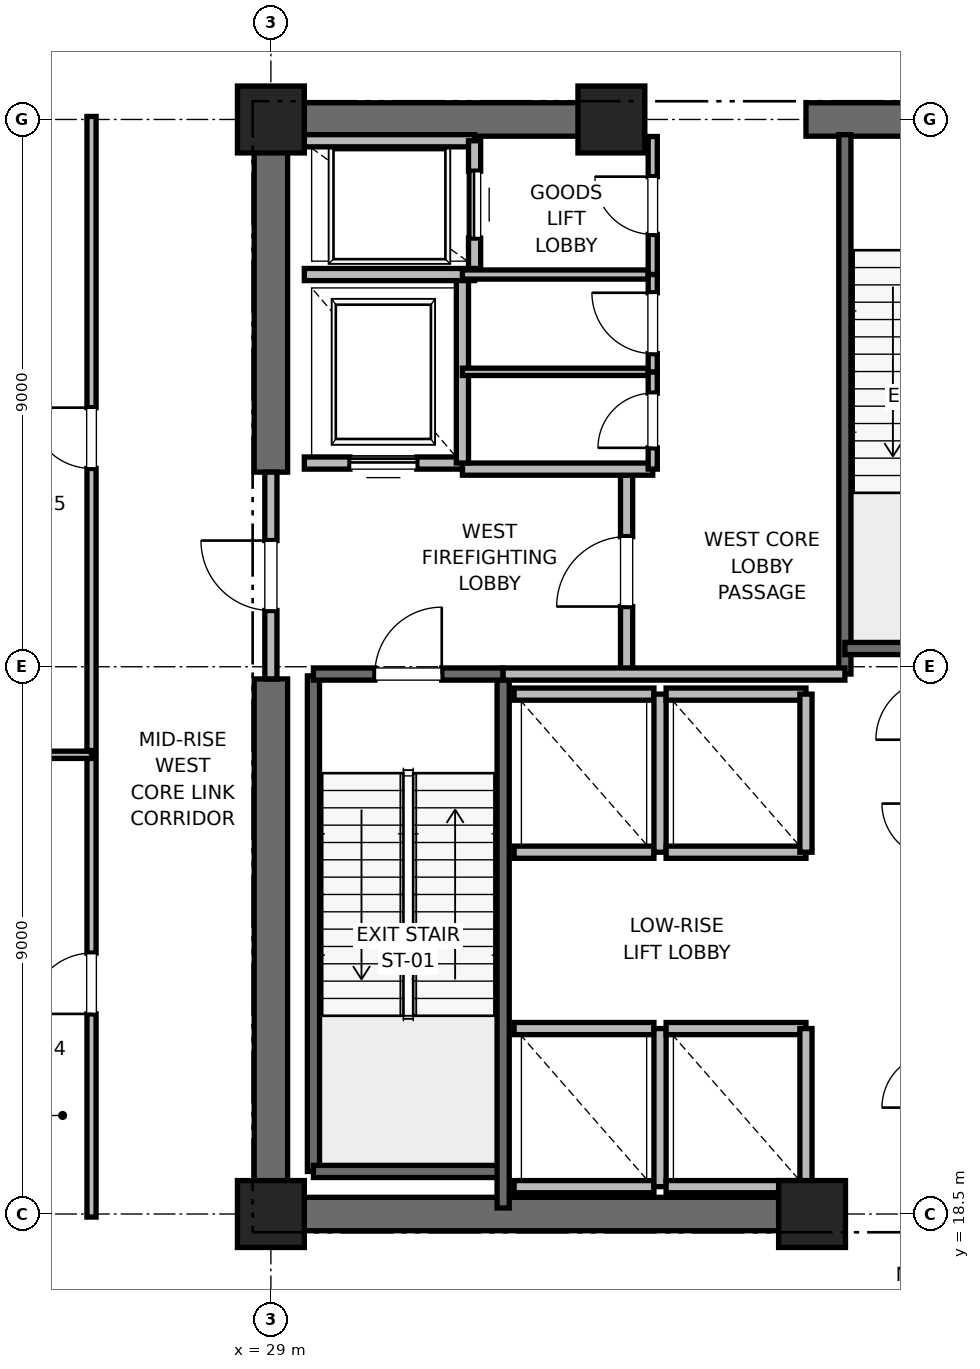
"""IFC4 building model, lengths in metres.
Left out: names, types, materials, properties, quantities, classifications, styles, units other than length and angle.
Written with IfcOpenShell. Run it as: python <this file> out.ifc"""

import sys

from ifc_helpers import new_model, si_unit, direction, frame, frame_2d, origin, origin_2d, place, context, subcontext, project, spatial, rectangle, extrude, element, fill, save


model = new_model("IFC4")
c1 = context("Model", 3, precision=1e-05, world=origin(), true_north=direction((0.0, 1.0)))
c2 = subcontext(c1, "Body", "Model", "MODEL_VIEW")
j1 = project(units=[si_unit("LENGTHUNIT", "METRE"), si_unit("PLANEANGLEUNIT", "RADIAN")], contexts=[c1])
p1 = place(None, origin())
s1 = spatial("IfcSite", under=j1, at=p1, CompositionType="ELEMENT")
p2 = place(p1, origin())
s2 = spatial("IfcBuilding", under=s1, at=p2, CompositionType="ELEMENT")
p3 = place(p2, frame((0.0, 0.0, 123.4)))
s3 = spatial("IfcBuildingStorey", under=s2, at=p3, CompositionType="ELEMENT", Elevation=123.4)
for number, where, z_axis, x_axis in (
    (1, (29.0, 18.5, 0.0), (0.0, 0.0, 1.0), (1.0, 0.0, 0.0)),
    (2, (29.0, 36.5, 0.0), (0.0, 0.0, 1.0), (1.0, 0.0, 0.0)),
    (3, (37.9, 18.5, 0.0), (0.0, 0.0, 1.0), (1.0, 0.0, 0.0)),
    (4, (34.6, 36.5, 0.0), (0.0, 0.0, 1.0), (1.0, 0.0, 0.0)),
):
    element("IfcColumn", number, at=place(p3, frame(where, z_axis=z_axis, x_axis=x_axis)), inside=s3, PredefinedType="PILASTER", context=c2, shape_type="SweptSolid", body=[
        extrude(rectangle(XDim=1.1, YDim=1.1, at=origin_2d()), origin(), (0.0, 0.0, 1.0), 5.0),
    ])
p4 = place(p3, frame((29.0, 18.5, 0.0), z_axis=(0.0, 0.0, 1.0), x_axis=(1.0, 0.0, 0.0)))
e5 = element("IfcWall", 5, at=p4, inside=s3, PredefinedType="SHEAR", context=c2, shape_type="SweptSolid", body=[
    extrude(rectangle(XDim=9.2, YDim=0.55, at=frame_2d((4.6, 0.0))), origin(), (0.0, 0.0, 1.0), 4.775),
])
p5 = place(p3, frame((29.0, 36.5, 0.0), z_axis=(0.0, 0.0, 1.0), x_axis=(1.0, 0.0, 0.0)))
e6 = element("IfcWall", 6, at=p5, inside=s3, PredefinedType="SHEAR", context=c2, shape_type="SweptSolid", body=[
    extrude(rectangle(XDim=5.8, YDim=0.55, at=frame_2d((2.9, 0.0))), origin(), (0.0, 0.0, 1.0), 4.775),
])
p6 = place(p3, frame((37.8, 36.5, 0.0), z_axis=(0.0, 0.0, 1.0), x_axis=(1.0, 0.0, 0.0)))
e7 = element("IfcWall", 7, at=p6, inside=s3, PredefinedType="SHEAR", context=c2, shape_type="SweptSolid", body=[
    extrude(rectangle(XDim=4.4, YDim=0.55, at=frame_2d((2.2, 0.0))), origin(), (0.0, 0.0, 1.0), 4.775),
])
p7 = place(p6, frame((1.65, 0.0, 0.0)))
e8 = element("IfcOpeningElement", 8, at=p7, cuts=e7, PredefinedType="OPENING", context=c2, shape_type="SweptSolid", body=[
    extrude(rectangle(XDim=1.1, YDim=2.15, at=frame_2d((0.55, 1.075))), frame((0.0, 0.275, 0.0), z_axis=(0.0, -1.0, 0.0), x_axis=(1.0, 0.0, 0.0)), (0.0, 0.0, 1.0), 0.55),
])
p8 = place(p3, frame((29.0, 18.5, 0.0), z_axis=(0.0, 0.0, 1.0), x_axis=(0.0, 1.0, 0.0)))
e9 = element("IfcWall", 9, at=p8, inside=s3, PredefinedType="SHEAR", context=c2, shape_type="SweptSolid", body=[
    extrude(rectangle(XDim=8.8, YDim=0.55, at=frame_2d((4.4, 0.0))), origin(), (0.0, 0.0, 1.0), 4.775),
])
p9 = place(p3, frame((29.0, 30.7, 0.0), z_axis=(0.0, 0.0, 1.0), x_axis=(0.0, 1.0, 0.0)))
e10 = element("IfcWall", 10, at=p9, inside=s3, PredefinedType="SHEAR", context=c2, shape_type="SweptSolid", body=[
    extrude(rectangle(XDim=5.8, YDim=0.55, at=frame_2d((2.9, 0.0))), origin(), (0.0, 0.0, 1.0), 4.775),
])
p10 = place(p3, frame((29.7, 19.2, 0.0), z_axis=(0.0, 0.0, 1.0), x_axis=(0.0, 1.0, 0.0)))
e11 = element("IfcWall", 11, at=p10, inside=s3, PredefinedType="SOLIDWALL", context=c2, shape_type="SweptSolid", body=[
    extrude(rectangle(XDim=8.15, YDim=0.2, at=frame_2d((4.075, 0.0))), origin(), (0.0, 0.0, 1.0), 4.775),
])
p11 = place(p3, frame((29.7, 19.2, 0.0), z_axis=(0.0, 0.0, 1.0), x_axis=(1.0, 0.0, 0.0)))
e12 = element("IfcWall", 12, at=p11, inside=s3, PredefinedType="SOLIDWALL", context=c2, shape_type="SweptSolid", body=[
    extrude(rectangle(XDim=3.12, YDim=0.2, at=frame_2d((1.56, 0.0))), origin(), (0.0, 0.0, 1.0), 4.775),
])
p12 = place(p3, frame((32.82, 18.6, 0.0), z_axis=(0.0, 0.0, 1.0), x_axis=(0.0, 1.0, 0.0)))
e13 = element("IfcWall", 13, at=p12, inside=s3, PredefinedType="SOLIDWALL", context=c2, shape_type="SweptSolid", body=[
    extrude(rectangle(XDim=8.78, YDim=0.2, at=frame_2d((4.39, 0.0))), origin(), (0.0, 0.0, 1.0), 4.775),
])
p13 = place(p3, frame((29.7, 27.38, 0.0), z_axis=(0.0, 0.0, 1.0), x_axis=(1.0, 0.0, 0.0)))
e14 = element("IfcWall", 14, at=p13, inside=s3, PredefinedType="SOLIDWALL", context=c2, shape_type="SweptSolid", body=[
    extrude(rectangle(XDim=3.12, YDim=0.2, at=frame_2d((1.56, 0.0))), origin(), (0.0, 0.0, 1.0), 4.775),
])
p14 = place(p13, frame((1.01, 0.0, 0.0)))
e15 = element("IfcOpeningElement", 15, at=p14, cuts=e14, PredefinedType="OPENING", context=c2, shape_type="SweptSolid", body=[
    extrude(rectangle(XDim=1.1, YDim=2.15, at=frame_2d((0.55, 1.075))), frame((0.0, 0.1, 0.0), z_axis=(0.0, -1.0, 0.0), x_axis=(1.0, 0.0, 0.0)), (0.0, 0.0, 1.0), 0.2),
])
p15 = place(p3, frame((38.44, 27.38, 0.0), z_axis=(0.0, 0.0, 1.0), x_axis=(0.0, 1.0, 0.0)))
e16 = element("IfcWall", 16, at=p15, inside=s3, PredefinedType="SOLIDWALL", context=c2, shape_type="SweptSolid", body=[
    extrude(rectangle(XDim=8.87, YDim=0.2, at=frame_2d((4.435, 0.0))), origin(), (0.0, 0.0, 1.0), 4.775),
])
p16 = place(p3, frame((38.44, 27.8, 0.0), z_axis=(0.0, 0.0, 1.0), x_axis=(1.0, 0.0, 0.0)))
e17 = element("IfcWall", 17, at=p16, inside=s3, PredefinedType="SOLIDWALL", context=c2, shape_type="SweptSolid", body=[
    extrude(rectangle(XDim=3.32, YDim=0.2, at=frame_2d((1.66, 0.0))), origin(), (0.0, 0.0, 1.0), 4.775),
])
p17 = place(p3, frame((34.85, 27.38, 0.0), z_axis=(0.0, 0.0, 1.0), x_axis=(0.0, 1.0, 0.0)))
e18 = element("IfcWall", 18, at=p17, inside=s3, PredefinedType="PARTITIONING", context=c2, shape_type="SweptSolid", body=[
    extrude(rectangle(XDim=3.37, YDim=0.2, at=frame_2d((1.685, 0.0))), origin(), (0.0, 0.0, 1.0), 4.775),
])
p18 = place(p17, frame((1.11, 0.0, 0.0)))
e19 = element("IfcOpeningElement", 19, at=p18, cuts=e18, PredefinedType="OPENING", context=c2, shape_type="SweptSolid", body=[
    extrude(rectangle(XDim=1.15, YDim=2.2, at=frame_2d((0.575, 1.1))), frame((0.0, 0.1, 0.0), z_axis=(0.0, -1.0, 0.0), x_axis=(1.0, 0.0, 0.0)), (0.0, 0.0, 1.0), 0.2),
])
p19 = place(p3, frame((29.0, 27.3, 0.0), z_axis=(0.0, 0.0, 1.0), x_axis=(0.0, 1.0, 0.0)))
e20 = element("IfcWall", 20, at=p19, inside=s3, PredefinedType="PARTITIONING", context=c2, shape_type="SweptSolid", body=[
    extrude(rectangle(XDim=3.4, YDim=0.2, at=frame_2d((1.7, 0.0))), origin(), (0.0, 0.0, 1.0), 3.755),
])
p20 = place(p19, frame((1.125, 0.0, 0.0)))
e21 = element("IfcOpeningElement", 21, at=p20, cuts=e20, PredefinedType="OPENING", context=c2, shape_type="SweptSolid", body=[
    extrude(rectangle(XDim=1.15, YDim=2.2, at=frame_2d((0.575, 1.1))), frame((0.0, 0.1, 0.0), z_axis=(0.0, -1.0, 0.0), x_axis=(1.0, 0.0, 0.0)), (0.0, 0.0, 1.0), 0.2),
])
p21 = place(p3, frame((32.82, 27.38, 0.0), z_axis=(0.0, 0.0, 1.0), x_axis=(1.0, 0.0, 0.0)))
e22 = element("IfcWall", 22, at=p21, inside=s3, PredefinedType="PARTITIONING", context=c2, shape_type="SweptSolid", body=[
    extrude(rectangle(XDim=5.62, YDim=0.2, at=frame_2d((2.81, 0.0))), origin(), (0.0, 0.0, 1.0), 4.775),
])
p22 = place(p3, frame((32.15, 30.75, 0.0), z_axis=(0.0, 0.0, 1.0), x_axis=(1.0, 0.0, 0.0)))
e23 = element("IfcWall", 23, at=p22, inside=s3, PredefinedType="PARTITIONING", context=c2, shape_type="SweptSolid", body=[
    extrude(rectangle(XDim=3.13, YDim=0.2, at=frame_2d((1.565, 0.0))), origin(), (0.0, 0.0, 1.0), 4.775),
])
p23 = place(p3, frame((29.55, 30.85, 0.0), z_axis=(0.0, 0.0, 1.0), x_axis=(1.0, 0.0, 0.0)))
e24 = element("IfcWall", 24, at=p23, inside=s3, PredefinedType="SOLIDWALL", context=c2, shape_type="SweptSolid", body=[
    extrude(rectangle(XDim=2.6, YDim=0.2, at=frame_2d((1.3, 0.0))), origin(), (0.0, 0.0, 1.0), 3.755),
])
p24 = place(p23, frame((0.75, 0.0, 0.0)))
e25 = element("IfcOpeningElement", 25, at=p24, cuts=e24, PredefinedType="OPENING", context=c2, shape_type="SweptSolid", body=[
    extrude(rectangle(XDim=1.1, YDim=2.2, at=frame_2d((0.55, 1.1))), frame((0.0, 0.1, 0.0), z_axis=(0.0, -1.0, 0.0), x_axis=(1.0, 0.0, 0.0)), (0.0, 0.0, 1.0), 0.2),
])
p25 = place(p3, frame((29.55, 33.95, 0.0), z_axis=(0.0, 0.0, 1.0), x_axis=(1.0, 0.0, 0.0)))
e26 = element("IfcWall", 26, at=p25, inside=s3, PredefinedType="SOLIDWALL", context=c2, shape_type="SweptSolid", body=[
    extrude(rectangle(XDim=2.8, YDim=0.2, at=frame_2d((1.4, 0.0))), origin(), (0.0, 0.0, 1.0), 4.775),
])
p26 = place(p3, frame((32.15, 30.85, 0.0), z_axis=(0.0, 0.0, 1.0), x_axis=(0.0, 1.0, 0.0)))
e27 = element("IfcWall", 27, at=p26, inside=s3, PredefinedType="SOLIDWALL", context=c2, shape_type="SweptSolid", body=[
    extrude(rectangle(XDim=3.0, YDim=0.2, at=frame_2d((1.5, 0.0))), origin(), (0.0, 0.0, 1.0), 4.775),
])
p27 = place(p3, frame((32.35, 36.15, 0.0), z_axis=(0.0, 0.0, 1.0), x_axis=(-1.0, 0.0, 0.0)))
e28 = element("IfcWall", 28, at=p27, inside=s3, PredefinedType="SOLIDWALL", context=c2, shape_type="SweptSolid", body=[
    extrude(rectangle(XDim=2.8, YDim=0.2, at=frame_2d((1.4, 0.0))), origin(), (0.0, 0.0, 1.0), 3.985),
])
p28 = place(p3, frame((32.35, 34.05, 0.0), z_axis=(0.0, 0.0, 1.0), x_axis=(0.0, 1.0, 0.0)))
e29 = element("IfcWall", 29, at=p28, inside=s3, PredefinedType="SOLIDWALL", context=c2, shape_type="SweptSolid", body=[
    extrude(rectangle(XDim=2.1, YDim=0.2, at=frame_2d((1.05, 0.0))), origin(), (0.0, 0.0, 1.0), 4.775),
])
p29 = place(p28, frame((0.5, 0.0, 0.0)))
e30 = element("IfcOpeningElement", 30, at=p29, cuts=e29, PredefinedType="OPENING", context=c2, shape_type="SweptSolid", body=[
    extrude(rectangle(XDim=1.1, YDim=2.2, at=frame_2d((0.55, 1.1))), frame((0.0, 0.1, 0.0), z_axis=(0.0, -1.0, 0.0), x_axis=(1.0, 0.0, 0.0)), (0.0, 0.0, 1.0), 0.2),
])
for number, where, z_axis, x_axis in (
    (31, (33.0, 18.95, 0.0), (0.0, 0.0, 1.0), (1.0, 0.0, 0.0)),
    (32, (35.3, 21.55, 0.0), (0.0, 0.0, 1.0), (-1.0, 0.0, 0.0)),
):
    element("IfcWall", number, at=place(p3, frame(where, z_axis=z_axis, x_axis=x_axis)), inside=s3, PredefinedType="SOLIDWALL", context=c2, shape_type="SweptSolid", body=[
        extrude(rectangle(XDim=2.3, YDim=0.2, at=frame_2d((1.15, 0.0))), origin(), (0.0, 0.0, 1.0), 4.775),
    ])
p30 = place(p3, frame((35.4, 18.95, 0.0), z_axis=(0.0, 0.0, 1.0), x_axis=(0.0, 1.0, 0.0)))
e33 = element("IfcWall", 33, at=p30, inside=s3, PredefinedType="SOLIDWALL", context=c2, shape_type="SweptSolid", body=[
    extrude(rectangle(XDim=2.6, YDim=0.2, at=frame_2d((1.3, 0.0))), origin(), (0.0, 0.0, 1.0), 4.775),
])
p31 = place(p3, frame((35.5, 18.95, 0.0), z_axis=(0.0, 0.0, 1.0), x_axis=(1.0, 0.0, 0.0)))
e34 = element("IfcWall", 34, at=p31, inside=s3, PredefinedType="SOLIDWALL", context=c2, shape_type="SweptSolid", body=[
    extrude(rectangle(XDim=2.3, YDim=0.2, at=frame_2d((1.15, 0.0))), origin(), (0.0, 0.0, 1.0), 3.755),
])
p32 = place(p3, frame((37.8, 21.55, 0.0), z_axis=(0.0, 0.0, 1.0), x_axis=(-1.0, 0.0, 0.0)))
e35 = element("IfcWall", 35, at=p32, inside=s3, PredefinedType="SOLIDWALL", context=c2, shape_type="SweptSolid", body=[
    extrude(rectangle(XDim=2.3, YDim=0.2, at=frame_2d((1.15, 0.0))), origin(), (0.0, 0.0, 1.0), 4.775),
])
p33 = place(p3, frame((37.8, 18.95, 0.0), z_axis=(0.0, 0.0, 1.0), x_axis=(0.0, 1.0, 0.0)))
e36 = element("IfcWall", 36, at=p33, inside=s3, PredefinedType="SOLIDWALL", context=c2, shape_type="SweptSolid", body=[
    extrude(rectangle(XDim=2.6, YDim=0.2, at=frame_2d((1.3, 0.0))), origin(), (0.0, 0.0, 1.0), 3.755),
])
for number, where, z_axis, x_axis in (
    (37, (33.0, 24.45, 0.0), (0.0, 0.0, 1.0), (1.0, 0.0, 0.0)),
    (38, (35.3, 27.05, 0.0), (0.0, 0.0, 1.0), (-1.0, 0.0, 0.0)),
):
    element("IfcWall", number, at=place(p3, frame(where, z_axis=z_axis, x_axis=x_axis)), inside=s3, PredefinedType="SOLIDWALL", context=c2, shape_type="SweptSolid", body=[
        extrude(rectangle(XDim=2.3, YDim=0.2, at=frame_2d((1.15, 0.0))), origin(), (0.0, 0.0, 1.0), 4.775),
    ])
p34 = place(p3, frame((35.4, 24.45, 0.0), z_axis=(0.0, 0.0, 1.0), x_axis=(0.0, 1.0, 0.0)))
e39 = element("IfcWall", 39, at=p34, inside=s3, PredefinedType="SOLIDWALL", context=c2, shape_type="SweptSolid", body=[
    extrude(rectangle(XDim=2.6, YDim=0.2, at=frame_2d((1.3, 0.0))), origin(), (0.0, 0.0, 1.0), 4.775),
])
for number, where, z_axis, x_axis in (
    (40, (35.5, 24.45, 0.0), (0.0, 0.0, 1.0), (1.0, 0.0, 0.0)),
    (41, (37.8, 27.05, 0.0), (0.0, 0.0, 1.0), (-1.0, 0.0, 0.0)),
):
    element("IfcWall", number, at=place(p3, frame(where, z_axis=z_axis, x_axis=x_axis)), inside=s3, PredefinedType="SOLIDWALL", context=c2, shape_type="SweptSolid", body=[
        extrude(rectangle(XDim=2.3, YDim=0.2, at=frame_2d((1.15, 0.0))), origin(), (0.0, 0.0, 1.0), 4.775),
    ])
p35 = place(p3, frame((37.8, 24.45, 0.0), z_axis=(0.0, 0.0, 1.0), x_axis=(0.0, 1.0, 0.0)))
e42 = element("IfcWall", 42, at=p35, inside=s3, PredefinedType="SOLIDWALL", context=c2, shape_type="SweptSolid", body=[
    extrude(rectangle(XDim=2.6, YDim=0.2, at=frame_2d((1.3, 0.0))), origin(), (0.0, 0.0, 1.0), 4.775),
])
p36 = place(p3, frame((32.15, 33.95, 0.0), z_axis=(0.0, 0.0, 1.0), x_axis=(1.0, 0.0, 0.0)))
e43 = element("IfcWall", 43, at=p36, inside=s3, PredefinedType="PARTITIONING", context=c2, shape_type="SweptSolid", body=[
    extrude(rectangle(XDim=3.13, YDim=0.15, at=frame_2d((1.565, 0.0))), origin(), (0.0, 0.0, 1.0), 2.85),
])
p37 = place(p3, frame((35.28, 33.95, 0.0), z_axis=(0.0, 0.0, 1.0), x_axis=(0.0, 1.0, 0.0)))
e44 = element("IfcWall", 44, at=p37, inside=s3, PredefinedType="PARTITIONING", context=c2, shape_type="SweptSolid", body=[
    extrude(rectangle(XDim=2.27, YDim=0.15, at=frame_2d((1.135, 0.0))), origin(), (0.0, 0.0, 1.0), 2.85),
])
p38 = place(p37, frame((0.66, 0.0, 0.0)))
e45 = element("IfcOpeningElement", 45, at=p38, cuts=e44, PredefinedType="OPENING", context=c2, shape_type="SweptSolid", body=[
    extrude(rectangle(XDim=0.95, YDim=2.15, at=frame_2d((0.475, 1.075))), frame((0.0, 0.075, 0.0), z_axis=(0.0, -1.0, 0.0), x_axis=(1.0, 0.0, 0.0)), (0.0, 0.0, 1.0), 0.15),
])
p39 = place(p3, frame((32.15, 32.35, 0.0), z_axis=(0.0, 0.0, 1.0), x_axis=(1.0, 0.0, 0.0)))
e46 = element("IfcWall", 46, at=p39, inside=s3, PredefinedType="PARTITIONING", context=c2, shape_type="SweptSolid", body=[
    extrude(rectangle(XDim=3.13, YDim=0.12, at=frame_2d((1.565, 0.0))), origin(), (0.0, 0.0, 1.0), 2.85),
])
p40 = place(p3, frame((35.28, 30.75, 0.0), z_axis=(0.0, 0.0, 1.0), x_axis=(0.0, 1.0, 0.0)))
e47 = element("IfcWall", 47, at=p40, inside=s3, PredefinedType="PARTITIONING", context=c2, shape_type="SweptSolid", body=[
    extrude(rectangle(XDim=1.6, YDim=0.15, at=frame_2d((0.8, 0.0))), origin(), (0.0, 0.0, 1.0), 2.85),
])
p41 = place(p40, frame((0.35, 0.0, 0.0)))
e48 = element("IfcOpeningElement", 48, at=p41, cuts=e47, PredefinedType="OPENING", context=c2, shape_type="SweptSolid", body=[
    extrude(rectangle(XDim=0.9, YDim=2.1, at=frame_2d((0.45, 1.05))), frame((0.0, 0.075, 0.0), z_axis=(0.0, -1.0, 0.0), x_axis=(1.0, 0.0, 0.0)), (0.0, 0.0, 1.0), 0.15),
])
p42 = place(p3, frame((35.28, 32.35, 0.0), z_axis=(0.0, 0.0, 1.0), x_axis=(0.0, 1.0, 0.0)))
e49 = element("IfcWall", 49, at=p42, inside=s3, PredefinedType="PARTITIONING", context=c2, shape_type="SweptSolid", body=[
    extrude(rectangle(XDim=1.6, YDim=0.15, at=frame_2d((0.8, 0.0))), origin(), (0.0, 0.0, 1.0), 2.85),
])
p43 = place(p42, frame((0.3, 0.0, 0.0)))
e50 = element("IfcOpeningElement", 50, at=p43, cuts=e49, PredefinedType="OPENING", context=c2, shape_type="SweptSolid", body=[
    extrude(rectangle(XDim=1.0, YDim=2.15, at=frame_2d((0.5, 1.075))), frame((0.0, 0.075, 0.0), z_axis=(0.0, -1.0, 0.0), x_axis=(1.0, 0.0, 0.0)), (0.0, 0.0, 1.0), 0.15),
])
p44 = place(p3, frame((26.05, 18.45, 0.0), z_axis=(0.0, 0.0, 1.0), x_axis=(0.0, 1.0, 0.0)))
e51 = element("IfcWall", 51, at=p44, inside=s3, PredefinedType="PARTITIONING", context=c2, shape_type="SweptSolid", body=[
    extrude(rectangle(XDim=7.602, YDim=0.15, at=frame_2d((3.801, 0.0))), origin(), (0.0, 0.0, 1.0), 2.85),
])
p45 = place(p44, frame((3.341, 0.0, 0.0)))
e52 = element("IfcOpeningElement", 52, at=p45, cuts=e51, PredefinedType="OPENING", context=c2, shape_type="SweptSolid", body=[
    extrude(rectangle(XDim=1.0, YDim=2.15, at=frame_2d((0.5, 1.075))), frame((0.0, 0.075, 0.0), z_axis=(0.0, -1.0, 0.0), x_axis=(1.0, 0.0, 0.0)), (0.0, 0.0, 1.0), 0.15),
])
p46 = place(p3, frame((13.815, 26.052, 0.0), z_axis=(0.0, 0.0, 1.0), x_axis=(1.0, 0.0, 0.0)))
e53 = element("IfcWall", 53, at=p46, inside=s3, PredefinedType="PARTITIONING", context=c2, shape_type="SweptSolid", body=[
    extrude(rectangle(XDim=12.235, YDim=0.12, at=frame_2d((6.117, 0.0))), origin(), (0.0, 0.0, 1.0), 2.85),
])
p47 = place(p3, frame((26.05, 26.122, 0.0), z_axis=(0.0, 0.0, 1.0), x_axis=(0.0, 1.0, 0.0)))
e54 = element("IfcWall", 54, at=p47, inside=s3, PredefinedType="PARTITIONING", context=c2, shape_type="SweptSolid", body=[
    extrude(rectangle(XDim=10.428, YDim=0.15, at=frame_2d((5.214, 0.0))), origin(), (0.0, 0.0, 1.0), 2.85),
])
p48 = place(p47, frame((4.639, 0.0, 0.0)))
e55 = element("IfcOpeningElement", 55, at=p48, cuts=e54, PredefinedType="OPENING", context=c2, shape_type="SweptSolid", body=[
    extrude(rectangle(XDim=1.0, YDim=2.15, at=frame_2d((0.5, 1.075))), frame((0.0, 0.075, 0.0), z_axis=(0.0, -1.0, 0.0), x_axis=(1.0, 0.0, 0.0)), (0.0, 0.0, 1.0), 0.15),
])
p49 = place(p14, origin())
e56 = element("IfcDoor", 56, at=p49, inside=s3, OperationType="SINGLE_SWING_RIGHT", PredefinedType="DOOR", context=c2, shape_type="SweptSolid", body=[
    extrude(rectangle(XDim=1.1, YDim=2.15, at=frame_2d((0.55, 1.075))), frame((0.0, 0.025, 0.0), z_axis=(0.0, -1.0, 0.0), x_axis=(1.0, 0.0, 0.0)), (0.0, 0.0, 1.0), 0.05),
])
fill(e15, e56)
p50 = place(p18, origin())
e57 = element("IfcDoor", 57, at=p50, inside=s3, OperationType="SINGLE_SWING_LEFT", PredefinedType="DOOR", context=c2, shape_type="SweptSolid", body=[
    extrude(rectangle(XDim=1.15, YDim=2.2, at=frame_2d((0.575, 1.1))), frame((0.0, 0.025, 0.0), z_axis=(0.0, -1.0, 0.0), x_axis=(1.0, 0.0, 0.0)), (0.0, 0.0, 1.0), 0.05),
])
fill(e19, e57)
p51 = place(p20, origin())
e58 = element("IfcDoor", 58, at=p51, inside=s3, OperationType="SINGLE_SWING_RIGHT", PredefinedType="DOOR", context=c2, shape_type="SweptSolid", body=[
    extrude(rectangle(XDim=1.15, YDim=2.2, at=frame_2d((0.575, 1.1))), frame((0.0, 0.025, 0.0), z_axis=(0.0, -1.0, 0.0), x_axis=(1.0, 0.0, 0.0)), (0.0, 0.0, 1.0), 0.05),
])
fill(e21, e58)
p52 = place(p24, origin())
e59 = element("IfcDoor", 59, at=p52, inside=s3, OperationType="SLIDING_TO_RIGHT", PredefinedType="DOOR", context=c2, shape_type="SweptSolid", body=[
    extrude(rectangle(XDim=1.1, YDim=2.2, at=frame_2d((0.55, 1.1))), frame((0.0, 0.025, 0.0), z_axis=(0.0, -1.0, 0.0), x_axis=(1.0, 0.0, 0.0)), (0.0, 0.0, 1.0), 0.05),
])
fill(e25, e59)
p53 = place(p29, origin())
e60 = element("IfcDoor", 60, at=p53, inside=s3, OperationType="SLIDING_TO_RIGHT", PredefinedType="DOOR", context=c2, shape_type="SweptSolid", body=[
    extrude(rectangle(XDim=1.1, YDim=2.2, at=frame_2d((0.55, 1.1))), frame((0.0, 0.025, 0.0), z_axis=(0.0, -1.0, 0.0), x_axis=(1.0, 0.0, 0.0)), (0.0, 0.0, 1.0), 0.05),
])
fill(e30, e60)
p54 = place(p38, origin())
e61 = element("IfcDoor", 61, at=p54, inside=s3, OperationType="SINGLE_SWING_RIGHT", PredefinedType="DOOR", context=c2, shape_type="SweptSolid", body=[
    extrude(rectangle(XDim=0.95, YDim=2.15, at=frame_2d((0.475, 1.075))), frame((0.0, 0.025, 0.0), z_axis=(0.0, -1.0, 0.0), x_axis=(1.0, 0.0, 0.0)), (0.0, 0.0, 1.0), 0.05),
])
fill(e45, e61)
p55 = place(p41, origin())
e62 = element("IfcDoor", 62, at=p55, inside=s3, OperationType="SINGLE_SWING_LEFT", PredefinedType="DOOR", context=c2, shape_type="SweptSolid", body=[
    extrude(rectangle(XDim=0.9, YDim=2.1, at=frame_2d((0.45, 1.05))), frame((0.0, 0.025, 0.0), z_axis=(0.0, -1.0, 0.0), x_axis=(1.0, 0.0, 0.0)), (0.0, 0.0, 1.0), 0.05),
])
fill(e48, e62)
p56 = place(p43, origin())
e63 = element("IfcDoor", 63, at=p56, inside=s3, OperationType="SINGLE_SWING_RIGHT", PredefinedType="DOOR", context=c2, shape_type="SweptSolid", body=[
    extrude(rectangle(XDim=1.0, YDim=2.15, at=frame_2d((0.5, 1.075))), frame((0.0, 0.025, 0.0), z_axis=(0.0, -1.0, 0.0), x_axis=(1.0, 0.0, 0.0)), (0.0, 0.0, 1.0), 0.05),
])
fill(e50, e63)
p57 = place(p45, origin())
e64 = element("IfcDoor", 64, at=p57, inside=s3, OperationType="SINGLE_SWING_LEFT", PredefinedType="DOOR", context=c2, shape_type="SweptSolid", body=[
    extrude(rectangle(XDim=1.0, YDim=2.15, at=frame_2d((0.5, 1.075))), frame((0.0, 0.025, 0.0), z_axis=(0.0, -1.0, 0.0), x_axis=(1.0, 0.0, 0.0)), (0.0, 0.0, 1.0), 0.05),
])
fill(e52, e64)
p58 = place(p48, origin())
e65 = element("IfcDoor", 65, at=p58, inside=s3, OperationType="SINGLE_SWING_RIGHT", PredefinedType="DOOR", context=c2, shape_type="SweptSolid", body=[
    extrude(rectangle(XDim=1.0, YDim=2.15, at=frame_2d((0.5, 1.075))), frame((0.0, 0.025, 0.0), z_axis=(0.0, -1.0, 0.0), x_axis=(1.0, 0.0, 0.0)), (0.0, 0.0, 1.0), 0.05),
])
fill(e55, e65)
save(model, sys.argv[1])
